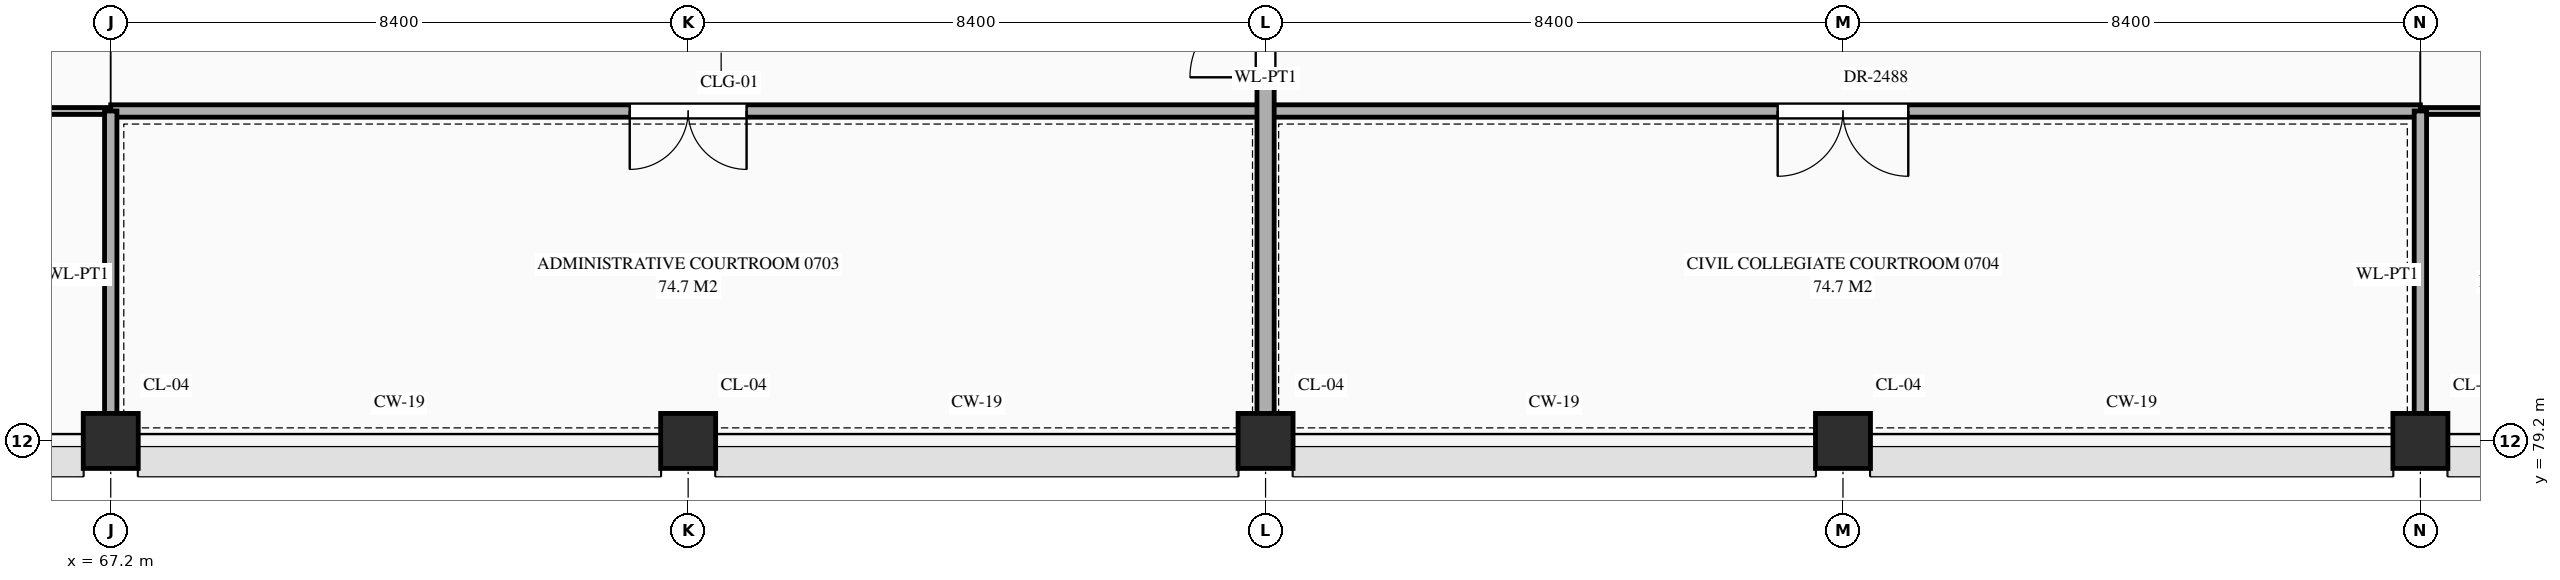
"""IFC4 building model, lengths in metres.
Left out: names, types, materials, properties, quantities, classifications, styles, units other than length and angle.
Written with IfcOpenShell. Run it as: python <this file> out.ifc"""

import sys

from ifc_helpers import new_model, si_unit, direction, frame, frame_2d, origin, origin_2d, place, context, subcontext, project, spatial, rectangle, extrude, element, fill, save


model = new_model("IFC4")
c1 = context("Model", 3, precision=1e-05, world=origin(), true_north=direction((0.0, 1.0)))
c2 = subcontext(c1, "Body", "Model", "MODEL_VIEW")
j1 = project(units=[si_unit("LENGTHUNIT", "METRE"), si_unit("PLANEANGLEUNIT", "RADIAN")], contexts=[c1])
p1 = place(None, origin())
s1 = spatial("IfcSite", under=j1, at=p1, CompositionType="ELEMENT")
p2 = place(p1, origin())
s2 = spatial("IfcBuilding", under=s1, at=p2, CompositionType="ELEMENT")
p3 = place(p2, frame((0.0, 0.0, 30.6)))
s3 = spatial("IfcBuildingStorey", under=s2, at=p3, CompositionType="ELEMENT", Elevation=30.6)
for number, where, z_axis, x_axis in (
    (1, (67.2, 79.2, 0.0), (0.0, 0.0, 1.0), (1.0, 0.0, 0.0)),
    (2, (75.6, 79.2, 0.0), (0.0, 0.0, 1.0), (1.0, 0.0, 0.0)),
    (3, (84.0, 79.2, 0.0), (0.0, 0.0, 1.0), (1.0, 0.0, 0.0)),
    (4, (92.4, 79.2, 0.0), (0.0, 0.0, 1.0), (1.0, 0.0, 0.0)),
    (5, (100.8, 79.2, 0.0), (0.0, 0.0, 1.0), (1.0, 0.0, 0.0)),
):
    element("IfcColumn", number, at=place(p3, frame(where, z_axis=z_axis, x_axis=x_axis)), inside=s3, PredefinedType="COLUMN", context=c2, shape_type="SweptSolid", body=[
        extrude(rectangle(XDim=0.8, YDim=0.8, at=origin_2d()), origin(), (0.0, 0.0, 1.0), 4.5),
    ])
p4 = place(p3, frame((50.4, 84.0, 0.0), z_axis=(0.0, 0.0, 1.0), x_axis=(1.0, 0.0, 0.0)))
e6 = element("IfcWall", 6, at=p4, inside=s3, PredefinedType="STANDARD", context=c2, shape_type="SweptSolid", body=[
    extrude(rectangle(XDim=16.8, YDim=0.1, at=frame_2d((8.4, 0.0))), origin(), (0.0, 0.0, 1.0), 4.24),
])
p5 = place(p4, frame((3.6, 0.0, 0.0)))
e7 = element("IfcOpeningElement", 7, at=p5, cuts=e6, PredefinedType="OPENING", context=c2, shape_type="SweptSolid", body=[
    extrude(rectangle(XDim=1.2, YDim=2.35, at=frame_2d((0.6, 1.175))), frame((0.0, 0.062, 0.0), z_axis=(0.0, -1.0, 0.0), x_axis=(1.0, 0.0, 0.0)), (0.0, 0.0, 1.0), 0.124),
])
p6 = place(p4, frame((11.98, 0.0, 0.0)))
e8 = element("IfcOpeningElement", 8, at=p6, cuts=e6, PredefinedType="OPENING", context=c2, shape_type="SweptSolid", body=[
    extrude(rectangle(XDim=1.24, YDim=2.3, at=frame_2d((0.62, 1.15))), frame((0.0, 0.062, 0.0), z_axis=(0.0, -1.0, 0.0), x_axis=(1.0, 0.0, 0.0)), (0.0, 0.0, 1.0), 0.124),
])
p7 = place(p3, frame((67.2, 84.0, 0.0), z_axis=(0.0, 0.0, 1.0), x_axis=(1.0, 0.0, 0.0)))
e9 = element("IfcWall", 9, at=p7, inside=s3, PredefinedType="STANDARD", context=c2, shape_type="SweptSolid", body=[
    extrude(rectangle(XDim=33.6, YDim=0.18, at=frame_2d((16.8, 0.0))), origin(), (0.0, 0.0, 1.0), 4.24),
])
p8 = place(p7, frame((7.55, 0.0, 0.0)))
e10 = element("IfcOpeningElement", 10, at=p8, cuts=e9, PredefinedType="OPENING", context=c2, shape_type="SweptSolid", body=[
    extrude(rectangle(XDim=1.7, YDim=2.45, at=frame_2d((0.85, 1.225))), frame((0.0, 0.102, 0.0), z_axis=(0.0, -1.0, 0.0), x_axis=(1.0, 0.0, 0.0)), (0.0, 0.0, 1.0), 0.204),
])
p9 = place(p7, frame((24.25, 0.0, 0.0)))
e11 = element("IfcOpeningElement", 11, at=p9, cuts=e9, PredefinedType="OPENING", context=c2, shape_type="SweptSolid", body=[
    extrude(rectangle(XDim=1.9, YDim=2.5, at=frame_2d((0.95, 1.25))), frame((0.0, 0.102, 0.0), z_axis=(0.0, -1.0, 0.0), x_axis=(1.0, 0.0, 0.0)), (0.0, 0.0, 1.0), 0.204),
])
p10 = place(p3, frame((100.8, 84.0, 0.0), z_axis=(0.0, 0.0, 1.0), x_axis=(1.0, 0.0, 0.0)))
e12 = element("IfcWall", 12, at=p10, inside=s3, PredefinedType="STANDARD", context=c2, shape_type="SweptSolid", body=[
    extrude(rectangle(XDim=16.8, YDim=0.1, at=frame_2d((8.4, 0.0))), origin(), (0.0, 0.0, 1.0), 4.24),
])
p11 = place(p10, frame((3.69, 0.0, 0.0)))
e13 = element("IfcOpeningElement", 13, at=p11, cuts=e12, PredefinedType="OPENING", context=c2, shape_type="SweptSolid", body=[
    extrude(rectangle(XDim=1.02, YDim=2.4, at=frame_2d((0.51, 1.2))), frame((0.0, 0.062, 0.0), z_axis=(0.0, -1.0, 0.0), x_axis=(1.0, 0.0, 0.0)), (0.0, 0.0, 1.0), 0.124),
])
p12 = place(p10, frame((12.07, 0.0, 0.0)))
e14 = element("IfcOpeningElement", 14, at=p12, cuts=e12, PredefinedType="OPENING", context=c2, shape_type="SweptSolid", body=[
    extrude(rectangle(XDim=1.06, YDim=2.4, at=frame_2d((0.53, 1.2))), frame((0.0, 0.062, 0.0), z_axis=(0.0, -1.0, 0.0), x_axis=(1.0, 0.0, 0.0)), (0.0, 0.0, 1.0), 0.124),
])
p13 = place(p3, frame((67.2, 79.24, 0.0), z_axis=(0.0, 0.0, 1.0), x_axis=(0.0, 1.0, 0.0)))
e15 = element("IfcWall", 15, at=p13, inside=s3, PredefinedType="STANDARD", context=c2, shape_type="SweptSolid", body=[
    extrude(rectangle(XDim=4.76, YDim=0.18, at=frame_2d((2.38, 0.0))), origin(), (0.0, 0.0, 1.0), 3.49),
])
p14 = place(p3, frame((84.0, 79.24, 0.0), z_axis=(0.0, 0.0, 1.0), x_axis=(0.0, 1.0, 0.0)))
e16 = element("IfcWall", 16, at=p14, inside=s3, PredefinedType="STANDARD", context=c2, shape_type="SweptSolid", body=[
    extrude(rectangle(XDim=35.92, YDim=0.25, at=frame_2d((17.96, 0.0))), origin(), (0.0, 0.0, 1.0), 3.49),
])
p15 = place(p14, frame((22.77, 0.0, 0.0)))
e17 = element("IfcOpeningElement", 17, at=p15, cuts=e16, PredefinedType="OPENING", context=c2, shape_type="SweptSolid", body=[
    extrude(rectangle(XDim=1.5, YDim=2.25, at=frame_2d((0.75, 1.125))), frame((0.0, 0.137, 0.0), z_axis=(0.0, -1.0, 0.0), x_axis=(1.0, 0.0, 0.0)), (0.0, 0.0, 1.0), 0.274),
])
p16 = place(p14, frame((12.525, 0.0, 0.0)))
e18 = element("IfcOpeningElement", 18, at=p16, cuts=e16, PredefinedType="OPENING", context=c2, shape_type="SweptSolid", body=[
    extrude(rectangle(XDim=0.95, YDim=2.15, at=frame_2d((0.475, 1.075))), frame((0.0, 0.137, 0.0), z_axis=(0.0, -1.0, 0.0), x_axis=(1.0, 0.0, 0.0)), (0.0, 0.0, 1.0), 0.274),
])
p17 = place(p14, frame((15.22, 0.0, 0.0)))
e19 = element("IfcOpeningElement", 19, at=p17, cuts=e16, PredefinedType="OPENING", context=c2, shape_type="SweptSolid", body=[
    extrude(rectangle(XDim=1.0, YDim=2.2, at=frame_2d((0.5, 1.1))), frame((0.0, 0.137, 0.0), z_axis=(0.0, -1.0, 0.0), x_axis=(1.0, 0.0, 0.0)), (0.0, 0.0, 1.0), 0.274),
])
p18 = place(p14, frame((25.8, 0.0, 0.0)))
e20 = element("IfcOpeningElement", 20, at=p18, cuts=e16, PredefinedType="OPENING", context=c2, shape_type="SweptSolid", body=[
    extrude(rectangle(XDim=2.0, YDim=2.4, at=frame_2d((1.0, 1.2))), frame((0.0, 0.137, 0.0), z_axis=(0.0, -1.0, 0.0), x_axis=(1.0, 0.0, 0.0)), (0.0, 0.0, 1.0), 0.274),
])
p19 = place(p14, frame((29.57, 0.0, 0.0)))
e21 = element("IfcOpeningElement", 21, at=p19, cuts=e16, PredefinedType="OPENING", context=c2, shape_type="SweptSolid", body=[
    extrude(rectangle(XDim=1.1, YDim=2.2, at=frame_2d((0.55, 1.1))), frame((0.0, 0.137, 0.0), z_axis=(0.0, -1.0, 0.0), x_axis=(1.0, 0.0, 0.0)), (0.0, 0.0, 1.0), 0.274),
])
p20 = place(p14, frame((5.25, 0.0, 0.0)))
e22 = element("IfcOpeningElement", 22, at=p20, cuts=e16, PredefinedType="OPENING", context=c2, shape_type="SweptSolid", body=[
    extrude(rectangle(XDim=1.1, YDim=2.2, at=frame_2d((0.55, 1.1))), frame((0.0, 0.137, 0.0), z_axis=(0.0, -1.0, 0.0), x_axis=(1.0, 0.0, 0.0)), (0.0, 0.0, 1.0), 0.274),
])
p21 = place(p3, frame((100.8, 79.24, 0.0), z_axis=(0.0, 0.0, 1.0), x_axis=(0.0, 1.0, 0.0)))
e23 = element("IfcWall", 23, at=p21, inside=s3, PredefinedType="STANDARD", context=c2, shape_type="SweptSolid", body=[
    extrude(rectangle(XDim=4.76, YDim=0.18, at=frame_2d((2.38, 0.0))), origin(), (0.0, 0.0, 1.0), 3.49),
])
p22 = place(p20, origin())
e24 = element("IfcDoor", 24, at=p22, inside=s3, OperationType="SINGLE_SWING_LEFT", PredefinedType="DOOR", context=c2, shape_type="SweptSolid", body=[
    extrude(rectangle(XDim=1.1, YDim=2.2, at=frame_2d((0.55, 1.1))), frame((0.0, 0.025, 0.0), z_axis=(0.0, -1.0, 0.0), x_axis=(1.0, 0.0, 0.0)), (0.0, 0.0, 1.0), 0.05),
])
fill(e22, e24)
p23 = place(p8, frame((1.7, 0.0, 0.0), z_axis=(0.0, 0.0, 1.0), x_axis=(-1.0, 0.0, 0.0)))
e25 = element("IfcDoor", 25, at=p23, inside=s3, OperationType="DOUBLE_DOOR_SINGLE_SWING", PredefinedType="DOOR", context=c2, shape_type="SweptSolid", body=[
    extrude(rectangle(XDim=1.7, YDim=2.45, at=frame_2d((0.85, 1.225))), frame((0.0, 0.025, 0.0), z_axis=(0.0, -1.0, 0.0), x_axis=(1.0, 0.0, 0.0)), (0.0, 0.0, 1.0), 0.05),
])
fill(e10, e25)
p24 = place(p9, frame((1.9, 0.0, 0.0), z_axis=(0.0, 0.0, 1.0), x_axis=(-1.0, 0.0, 0.0)))
e26 = element("IfcDoor", 26, at=p24, inside=s3, OperationType="DOUBLE_DOOR_SINGLE_SWING", PredefinedType="DOOR", context=c2, shape_type="SweptSolid", body=[
    extrude(rectangle(XDim=1.9, YDim=2.5, at=frame_2d((0.95, 1.25))), frame((0.0, 0.025, 0.0), z_axis=(0.0, -1.0, 0.0), x_axis=(1.0, 0.0, 0.0)), (0.0, 0.0, 1.0), 0.05),
])
fill(e11, e26)
save(model, sys.argv[1])
